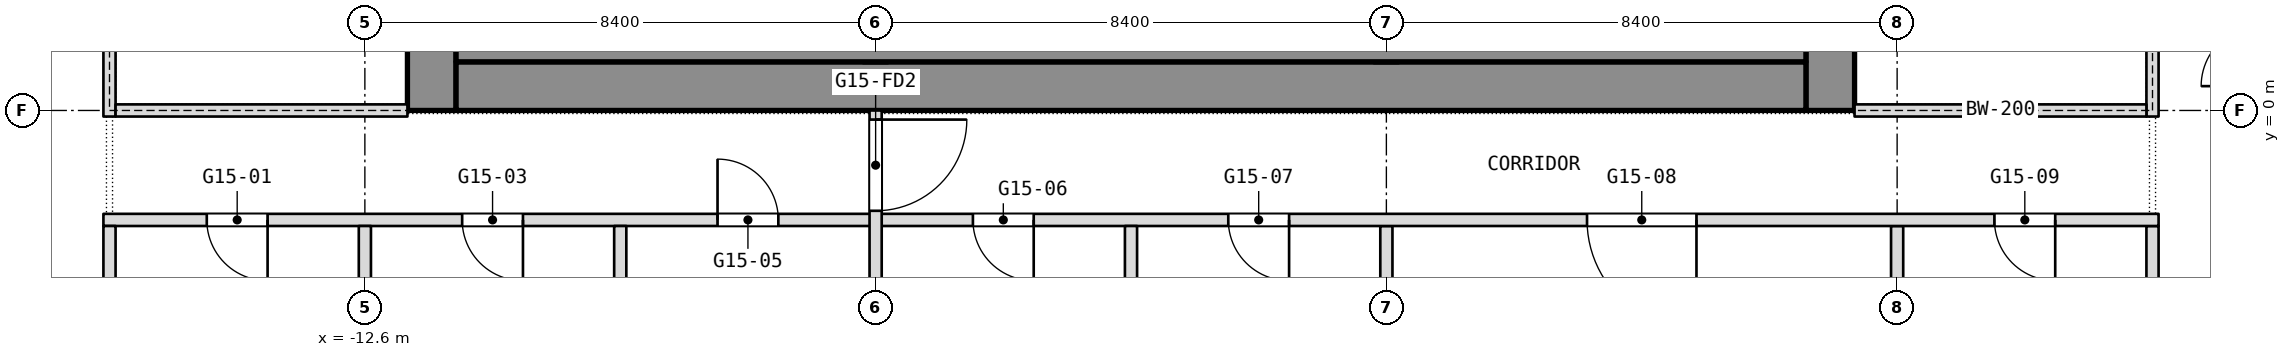
"""IFC4 building model, lengths in metres.
Left out: names, types, materials, properties, quantities, classifications, styles, units other than length and angle.
Written with IfcOpenShell. Run it as: python <this file> out.ifc"""

import sys

from ifc_helpers import new_model, si_unit, direction, frame, frame_2d, origin, place, context, subcontext, project, spatial, rectangle, extrude, element, fill, save


model = new_model("IFC4")
c1 = context("Model", 3, precision=1e-05, world=origin(), true_north=direction((0.0, 1.0)))
c2 = subcontext(c1, "Body", "Model", "MODEL_VIEW")
j1 = project(units=[si_unit("LENGTHUNIT", "METRE"), si_unit("PLANEANGLEUNIT", "RADIAN")], contexts=[c1])
p1 = place(None, origin())
s1 = spatial("IfcSite", under=j1, at=p1, CompositionType="ELEMENT")
p2 = place(p1, origin())
s2 = spatial("IfcBuilding", under=s1, at=p2, CompositionType="ELEMENT")
p3 = place(p2, frame((0.0, 0.0, 194.9)))
s3 = spatial("IfcBuildingStorey", under=s2, at=p3, CompositionType="ELEMENT", Elevation=194.9)
p4 = place(p3, frame((11.5, 0.0, 0.0), z_axis=(0.0, 0.0, 1.0), x_axis=(0.0, 1.0, 0.0)))
e1 = element("IfcWall", 1, at=p4, inside=s3, PredefinedType="SHEAR", context=c2, shape_type="SweptSolid", body=[
    extrude(rectangle(XDim=16.8, YDim=0.8, at=frame_2d((8.4, 0.0))), origin(), (0.0, 0.0, 1.0), 3.6),
])
p5 = place(p4, frame((2.3, 0.0, 0.0)))
e2 = element("IfcOpeningElement", 2, at=p5, cuts=e1, PredefinedType="OPENING", context=c2, shape_type="SweptSolid", body=[
    extrude(rectangle(XDim=1.1, YDim=2.1, at=frame_2d((0.55, 1.05))), frame((0.0, 0.4, 0.0), z_axis=(0.0, -1.0, 0.0), x_axis=(1.0, 0.0, 0.0)), (0.0, 0.0, 1.0), 0.8),
])
p6 = place(p4, frame((4.85, 0.0, 0.0)))
e3 = element("IfcOpeningElement", 3, at=p6, cuts=e1, PredefinedType="OPENING", context=c2, shape_type="SweptSolid", body=[
    extrude(rectangle(XDim=1.1, YDim=2.1, at=frame_2d((0.55, 1.05))), frame((0.0, 0.4, 0.0), z_axis=(0.0, -1.0, 0.0), x_axis=(1.0, 0.0, 0.0)), (0.0, 0.0, 1.0), 0.8),
])
p7 = place(p4, frame((6.825, 0.0, 0.0)))
e4 = element("IfcOpeningElement", 4, at=p7, cuts=e1, PredefinedType="OPENING", context=c2, shape_type="SweptSolid", body=[
    extrude(rectangle(XDim=1.2, YDim=2.1, at=frame_2d((0.6, 1.05))), frame((0.0, 0.4, 0.0), z_axis=(0.0, -1.0, 0.0), x_axis=(1.0, 0.0, 0.0)), (0.0, 0.0, 1.0), 0.8),
])
p8 = place(p4, frame((13.4, 0.0, 0.0)))
e5 = element("IfcOpeningElement", 5, at=p8, cuts=e1, PredefinedType="OPENING", context=c2, shape_type="SweptSolid", body=[
    extrude(rectangle(XDim=1.1, YDim=2.1, at=frame_2d((0.55, 1.05))), frame((0.0, 0.4, 0.0), z_axis=(0.0, -1.0, 0.0), x_axis=(1.0, 0.0, 0.0)), (0.0, 0.0, 1.0), 0.8),
])
p9 = place(p4, frame((10.85, 0.0, 0.0)))
e6 = element("IfcOpeningElement", 6, at=p9, cuts=e1, PredefinedType="OPENING", context=c2, shape_type="SweptSolid", body=[
    extrude(rectangle(XDim=1.1, YDim=2.1, at=frame_2d((0.55, 1.05))), frame((0.0, 0.4, 0.0), z_axis=(0.0, -1.0, 0.0), x_axis=(1.0, 0.0, 0.0)), (0.0, 0.0, 1.0), 0.8),
])
p10 = place(p4, frame((8.775, 0.0, 0.0)))
e7 = element("IfcOpeningElement", 7, at=p10, cuts=e1, PredefinedType="OPENING", context=c2, shape_type="SweptSolid", body=[
    extrude(rectangle(XDim=1.2, YDim=2.1, at=frame_2d((0.6, 1.05))), frame((0.0, 0.4, 0.0), z_axis=(0.0, -1.0, 0.0), x_axis=(1.0, 0.0, 0.0)), (0.0, 0.0, 1.0), 0.8),
])
p11 = place(p3, frame((-11.5, 0.0, 0.0), z_axis=(0.0, 0.0, 1.0), x_axis=(0.0, 1.0, 0.0)))
e8 = element("IfcWall", 8, at=p11, inside=s3, PredefinedType="SHEAR", context=c2, shape_type="SweptSolid", body=[
    extrude(rectangle(XDim=16.8, YDim=0.8, at=frame_2d((8.4, 0.0))), origin(), (0.0, 0.0, 1.0), 3.6),
])
p12 = place(p11, frame((1.837, 0.0, 0.0)))
e9 = element("IfcOpeningElement", 9, at=p12, cuts=e8, PredefinedType="OPENING", context=c2, shape_type="SweptSolid", body=[
    extrude(rectangle(XDim=0.9, YDim=2.1, at=frame_2d((0.45, 1.05))), frame((0.0, 0.4, 0.0), z_axis=(0.0, -1.0, 0.0), x_axis=(1.0, 0.0, 0.0)), (0.0, 0.0, 1.0), 0.8),
])
p13 = place(p11, frame((4.462, 0.0, 0.0)))
e10 = element("IfcOpeningElement", 10, at=p13, cuts=e8, PredefinedType="OPENING", context=c2, shape_type="SweptSolid", body=[
    extrude(rectangle(XDim=0.9, YDim=2.1, at=frame_2d((0.45, 1.05))), frame((0.0, 0.4, 0.0), z_axis=(0.0, -1.0, 0.0), x_axis=(1.0, 0.0, 0.0)), (0.0, 0.0, 1.0), 0.8),
])
p14 = place(p11, frame((6.825, 0.0, 0.0)))
e11 = element("IfcOpeningElement", 11, at=p14, cuts=e8, PredefinedType="OPENING", context=c2, shape_type="SweptSolid", body=[
    extrude(rectangle(XDim=1.2, YDim=2.1, at=frame_2d((0.6, 1.05))), frame((0.0, 0.4, 0.0), z_axis=(0.0, -1.0, 0.0), x_axis=(1.0, 0.0, 0.0)), (0.0, 0.0, 1.0), 0.8),
])
p15 = place(p11, frame((12.3, 0.0, 0.0)))
e12 = element("IfcOpeningElement", 12, at=p15, cuts=e8, PredefinedType="OPENING", context=c2, shape_type="SweptSolid", body=[
    extrude(rectangle(XDim=0.9, YDim=2.1, at=frame_2d((0.45, 1.05))), frame((0.0, 0.4, 0.0), z_axis=(0.0, -1.0, 0.0), x_axis=(1.0, 0.0, 0.0)), (0.0, 0.0, 1.0), 0.8),
])
p16 = place(p11, frame((8.775, 0.0, 0.0)))
e13 = element("IfcOpeningElement", 13, at=p16, cuts=e8, PredefinedType="OPENING", context=c2, shape_type="SweptSolid", body=[
    extrude(rectangle(XDim=1.2, YDim=2.1, at=frame_2d((0.6, 1.05))), frame((0.0, 0.4, 0.0), z_axis=(0.0, -1.0, 0.0), x_axis=(1.0, 0.0, 0.0)), (0.0, 0.0, 1.0), 0.8),
])
p17 = place(p3, frame((-11.1, 0.4, 0.0), z_axis=(0.0, 0.0, 1.0), x_axis=(1.0, 0.0, 0.0)))
e14 = element("IfcWall", 14, at=p17, inside=s3, PredefinedType="SHEAR", context=c2, shape_type="SweptSolid", body=[
    extrude(rectangle(XDim=22.2, YDim=0.8, at=frame_2d((11.1, 0.0))), origin(), (0.0, 0.0, 1.0), 3.6),
])
p18 = place(p3, frame((-4.2, 0.8, 0.0), z_axis=(0.0, 0.0, 1.0), x_axis=(0.0, 1.0, 0.0)))
e15 = element("IfcWall", 15, at=p18, inside=s3, PredefinedType="SHEAR", context=c2, shape_type="SweptSolid", body=[
    extrude(rectangle(XDim=15.2, YDim=0.4, at=frame_2d((7.6, 0.0))), origin(), (0.0, 0.0, 1.0), 3.6),
])
p19 = place(p18, frame((8.5, 0.0, 0.0)))
e16 = element("IfcOpeningElement", 16, at=p19, cuts=e15, PredefinedType="OPENING", context=c2, shape_type="SweptSolid", body=[
    extrude(rectangle(XDim=1.2, YDim=2.1, at=frame_2d((0.6, 1.05))), frame((0.0, 0.2, 0.0), z_axis=(0.0, -1.0, 0.0), x_axis=(1.0, 0.0, 0.0)), (0.0, 0.0, 1.0), 0.4),
])
p20 = place(p3, frame((4.2, 0.8, 0.0), z_axis=(0.0, 0.0, 1.0), x_axis=(0.0, 1.0, 0.0)))
e17 = element("IfcWall", 17, at=p20, inside=s3, PredefinedType="SHEAR", context=c2, shape_type="SweptSolid", body=[
    extrude(rectangle(XDim=15.2, YDim=0.4, at=frame_2d((7.6, 0.0))), origin(), (0.0, 0.0, 1.0), 3.6),
])
p21 = place(p20, frame((5.95, 0.0, 0.0)))
e18 = element("IfcOpeningElement", 18, at=p21, cuts=e17, PredefinedType="OPENING", context=c2, shape_type="SweptSolid", body=[
    extrude(rectangle(XDim=1.2, YDim=2.1, at=frame_2d((0.6, 1.05))), frame((0.0, 0.2, 0.0), z_axis=(0.0, -1.0, 0.0), x_axis=(1.0, 0.0, 0.0)), (0.0, 0.0, 1.0), 0.4),
])
for number, where, z_axis, x_axis in (
    (19, (16.8, -7.8, 0.0), (0.0, 0.0, 1.0), (0.0, 1.0, 0.0)),
    (20, (12.6, -7.8, 0.0), (0.0, 0.0, 1.0), (0.0, 1.0, 0.0)),
):
    element("IfcWall", number, at=place(p3, frame(where, z_axis=z_axis, x_axis=x_axis)), inside=s3, PredefinedType="PARTITIONING", context=c2, shape_type="SweptSolid", body=[
        extrude(rectangle(XDim=5.9, YDim=0.2, at=frame_2d((2.95, 0.0))), origin(), (0.0, 0.0, 1.0), 3.34),
    ])
p22 = place(p3, frame((4.2, -11.6, 0.0), z_axis=(0.0, 0.0, 1.0), x_axis=(0.0, 1.0, 0.0)))
e21 = element("IfcWall", 21, at=p22, inside=s3, PredefinedType="PARTITIONING", context=c2, shape_type="SweptSolid", body=[
    extrude(rectangle(XDim=9.7, YDim=0.2, at=frame_2d((4.85, 0.0))), origin(), (0.0, 0.0, 1.0), 3.34),
])
p23 = place(p3, frame((-16.9, -1.8, 0.0), z_axis=(0.0, 0.0, 1.0), x_axis=(1.0, 0.0, 0.0)))
e22 = element("IfcWall", 22, at=p23, inside=s3, PredefinedType="PARTITIONING", context=c2, shape_type="SweptSolid", body=[
    extrude(rectangle(XDim=33.8, YDim=0.2, at=frame_2d((16.9, 0.0))), origin(), (0.0, 0.0, 1.0), 3.34),
])
p24 = place(p23, frame((1.7, 0.0, 0.0)))
e23 = element("IfcOpeningElement", 23, at=p24, cuts=e22, PredefinedType="OPENING", context=c2, shape_type="SweptSolid", body=[
    extrude(rectangle(XDim=1.0, YDim=2.1, at=frame_2d((0.5, 1.05))), frame((0.0, 0.1, 0.0), z_axis=(0.0, -1.0, 0.0), x_axis=(1.0, 0.0, 0.0)), (0.0, 0.0, 1.0), 0.2),
])
p25 = place(p23, frame((5.9, 0.0, 0.0)))
e24 = element("IfcOpeningElement", 24, at=p25, cuts=e22, PredefinedType="OPENING", context=c2, shape_type="SweptSolid", body=[
    extrude(rectangle(XDim=1.0, YDim=2.1, at=frame_2d((0.5, 1.05))), frame((0.0, 0.1, 0.0), z_axis=(0.0, -1.0, 0.0), x_axis=(1.0, 0.0, 0.0)), (0.0, 0.0, 1.0), 0.2),
])
p26 = place(p23, frame((10.1, 0.0, 0.0)))
e25 = element("IfcOpeningElement", 25, at=p26, cuts=e22, PredefinedType="OPENING", context=c2, shape_type="SweptSolid", body=[
    extrude(rectangle(XDim=1.0, YDim=2.1, at=frame_2d((0.5, 1.05))), frame((0.0, 0.1, 0.0), z_axis=(0.0, -1.0, 0.0), x_axis=(1.0, 0.0, 0.0)), (0.0, 0.0, 1.0), 0.2),
])
p27 = place(p23, frame((14.3, 0.0, 0.0)))
e26 = element("IfcOpeningElement", 26, at=p27, cuts=e22, PredefinedType="OPENING", context=c2, shape_type="SweptSolid", body=[
    extrude(rectangle(XDim=1.0, YDim=2.1, at=frame_2d((0.5, 1.05))), frame((0.0, 0.1, 0.0), z_axis=(0.0, -1.0, 0.0), x_axis=(1.0, 0.0, 0.0)), (0.0, 0.0, 1.0), 0.2),
])
p28 = place(p23, frame((18.5, 0.0, 0.0)))
e27 = element("IfcOpeningElement", 27, at=p28, cuts=e22, PredefinedType="OPENING", context=c2, shape_type="SweptSolid", body=[
    extrude(rectangle(XDim=1.0, YDim=2.1, at=frame_2d((0.5, 1.05))), frame((0.0, 0.1, 0.0), z_axis=(0.0, -1.0, 0.0), x_axis=(1.0, 0.0, 0.0)), (0.0, 0.0, 1.0), 0.2),
])
p29 = place(p23, frame((24.4, 0.0, 0.0)))
e28 = element("IfcOpeningElement", 28, at=p29, cuts=e22, PredefinedType="OPENING", context=c2, shape_type="SweptSolid", body=[
    extrude(rectangle(XDim=1.8, YDim=2.1, at=frame_2d((0.9, 1.05))), frame((0.0, 0.1, 0.0), z_axis=(0.0, -1.0, 0.0), x_axis=(1.0, 0.0, 0.0)), (0.0, 0.0, 1.0), 0.2),
])
p30 = place(p23, frame((31.1, 0.0, 0.0)))
e29 = element("IfcOpeningElement", 29, at=p30, cuts=e22, PredefinedType="OPENING", context=c2, shape_type="SweptSolid", body=[
    extrude(rectangle(XDim=1.0, YDim=2.1, at=frame_2d((0.5, 1.05))), frame((0.0, 0.1, 0.0), z_axis=(0.0, -1.0, 0.0), x_axis=(1.0, 0.0, 0.0)), (0.0, 0.0, 1.0), 0.2),
])
p31 = place(p3, frame((0.0, -11.6, 0.0), z_axis=(0.0, 0.0, 1.0), x_axis=(0.0, 1.0, 0.0)))
e30 = element("IfcWall", 30, at=p31, inside=s3, PredefinedType="PARTITIONING", context=c2, shape_type="SweptSolid", body=[
    extrude(rectangle(XDim=9.7, YDim=0.2, at=frame_2d((4.85, 0.0))), origin(), (0.0, 0.0, 1.0), 3.34),
])
p32 = place(p3, frame((-4.2, -13.6, 0.0), z_axis=(0.0, 0.0, 1.0), x_axis=(0.0, 1.0, 0.0)))
e31 = element("IfcWall", 31, at=p32, inside=s3, PredefinedType="PARTITIONING", context=c2, shape_type="SweptSolid", body=[
    extrude(rectangle(XDim=13.6, YDim=0.2, at=frame_2d((6.8, 0.0))), origin(), (0.0, 0.0, 1.0), 3.34),
])
p33 = place(p32, frame((11.95, 0.0, 0.0)))
e32 = element("IfcOpeningElement", 32, at=p33, cuts=e31, PredefinedType="OPENING", context=c2, shape_type="SweptSolid", body=[
    extrude(rectangle(XDim=1.5, YDim=2.1, at=frame_2d((0.75, 1.05))), frame((0.0, 0.1, 0.0), z_axis=(0.0, -1.0, 0.0), x_axis=(1.0, 0.0, 0.0)), (0.0, 0.0, 1.0), 0.2),
])
p34 = place(p32, frame((0.25, 0.0, 0.0)))
e33 = element("IfcOpeningElement", 33, at=p34, cuts=e31, PredefinedType="OPENING", context=c2, shape_type="SweptSolid", body=[
    extrude(rectangle(XDim=1.5, YDim=2.1, at=frame_2d((0.75, 1.05))), frame((0.0, 0.1, 0.0), z_axis=(0.0, -1.0, 0.0), x_axis=(1.0, 0.0, 0.0)), (0.0, 0.0, 1.0), 0.2),
])
p35 = place(p3, frame((-8.4, -8.0, 0.0), z_axis=(0.0, 0.0, 1.0), x_axis=(0.0, 1.0, 0.0)))
e34 = element("IfcWall", 34, at=p35, inside=s3, PredefinedType="PARTITIONING", context=c2, shape_type="SweptSolid", body=[
    extrude(rectangle(XDim=6.1, YDim=0.2, at=frame_2d((3.05, 0.0))), origin(), (0.0, 0.0, 1.0), 3.34),
])
p36 = place(p3, frame((-12.6, -7.8, 0.0), z_axis=(0.0, 0.0, 1.0), x_axis=(0.0, 1.0, 0.0)))
e35 = element("IfcWall", 35, at=p36, inside=s3, PredefinedType="PARTITIONING", context=c2, shape_type="SweptSolid", body=[
    extrude(rectangle(XDim=5.9, YDim=0.2, at=frame_2d((2.95, 0.0))), origin(), (0.0, 0.0, 1.0), 3.34),
])
p37 = place(p3, frame((-16.8, -8.0, 0.0), z_axis=(0.0, 0.0, 1.0), x_axis=(0.0, 1.0, 0.0)))
e36 = element("IfcWall", 36, at=p37, inside=s3, PredefinedType="PARTITIONING", context=c2, shape_type="SweptSolid", body=[
    extrude(rectangle(XDim=6.1, YDim=0.2, at=frame_2d((3.05, 0.0))), origin(), (0.0, 0.0, 1.0), 3.34),
])
p38 = place(p3, frame((-11.1, 1.15, 0.0), z_axis=(0.0, 0.0, 1.0), x_axis=(1.0, 0.0, 0.0)))
e37 = element("IfcWall", 37, at=p38, inside=s3, PredefinedType="PARTITIONING", context=c2, shape_type="SweptSolid", body=[
    extrude(rectangle(XDim=22.2, YDim=0.7, at=frame_2d((11.1, 0.0))), origin(), (0.0, 0.0, 1.0), 3.34),
])
p39 = place(p3, frame((-16.8, -0.1, 0.0), z_axis=(0.0, 0.0, 1.0), x_axis=(0.0, 1.0, 0.0)))
e38 = element("IfcWall", 38, at=p39, inside=s3, PredefinedType="PARTITIONING", context=c2, shape_type="SweptSolid", body=[
    extrude(rectangle(XDim=17.0, YDim=0.2, at=frame_2d((8.5, 0.0))), origin(), (0.0, 0.0, 1.0), 3.34),
])
p40 = place(p39, frame((2.2, 0.0, 0.0)))
e39 = element("IfcOpeningElement", 39, at=p40, cuts=e38, PredefinedType="OPENING", context=c2, shape_type="SweptSolid", body=[
    extrude(rectangle(XDim=1.8, YDim=2.1, at=frame_2d((0.9, 1.05))), frame((0.0, 0.1, 0.0), z_axis=(0.0, -1.0, 0.0), x_axis=(1.0, 0.0, 0.0)), (0.0, 0.0, 1.0), 0.2),
])
p41 = place(p39, frame((13.0, 0.0, 0.0)))
e40 = element("IfcOpeningElement", 40, at=p41, cuts=e38, PredefinedType="OPENING", context=c2, shape_type="SweptSolid", body=[
    extrude(rectangle(XDim=1.8, YDim=2.1, at=frame_2d((0.9, 1.05))), frame((0.0, 0.1, 0.0), z_axis=(0.0, -1.0, 0.0), x_axis=(1.0, 0.0, 0.0)), (0.0, 0.0, 1.0), 0.2),
])
p42 = place(p3, frame((-16.7, 0.0, 0.0), z_axis=(0.0, 0.0, 1.0), x_axis=(1.0, 0.0, 0.0)))
e41 = element("IfcWall", 41, at=p42, inside=s3, PredefinedType="PARTITIONING", context=c2, shape_type="SweptSolid", body=[
    extrude(rectangle(XDim=4.8, YDim=0.2, at=frame_2d((2.4, 0.0))), origin(), (0.0, 0.0, 1.0), 2.94),
])
p43 = place(p3, frame((16.8, -0.1, 0.0), z_axis=(0.0, 0.0, 1.0), x_axis=(0.0, 1.0, 0.0)))
e42 = element("IfcWall", 42, at=p43, inside=s3, PredefinedType="PARTITIONING", context=c2, shape_type="SweptSolid", body=[
    extrude(rectangle(XDim=17.0, YDim=0.2, at=frame_2d((8.5, 0.0))), origin(), (0.0, 0.0, 1.0), 3.34),
])
p44 = place(p43, frame((2.2, 0.0, 0.0)))
e43 = element("IfcOpeningElement", 43, at=p44, cuts=e42, PredefinedType="OPENING", context=c2, shape_type="SweptSolid", body=[
    extrude(rectangle(XDim=1.8, YDim=2.1, at=frame_2d((0.9, 1.05))), frame((0.0, 0.1, 0.0), z_axis=(0.0, -1.0, 0.0), x_axis=(1.0, 0.0, 0.0)), (0.0, 0.0, 1.0), 0.2),
])
p45 = place(p43, frame((13.0, 0.0, 0.0)))
e44 = element("IfcOpeningElement", 44, at=p45, cuts=e42, PredefinedType="OPENING", context=c2, shape_type="SweptSolid", body=[
    extrude(rectangle(XDim=1.8, YDim=2.1, at=frame_2d((0.9, 1.05))), frame((0.0, 0.1, 0.0), z_axis=(0.0, -1.0, 0.0), x_axis=(1.0, 0.0, 0.0)), (0.0, 0.0, 1.0), 0.2),
])
p46 = place(p3, frame((11.9, 0.0, 0.0), z_axis=(0.0, 0.0, 1.0), x_axis=(1.0, 0.0, 0.0)))
e45 = element("IfcWall", 45, at=p46, inside=s3, PredefinedType="PARTITIONING", context=c2, shape_type="SweptSolid", body=[
    extrude(rectangle(XDim=4.8, YDim=0.2, at=frame_2d((2.4, 0.0))), origin(), (0.0, 0.0, 1.0), 2.94),
])
p47 = place(p24, origin())
e46 = element("IfcDoor", 46, at=p47, inside=s3, OperationType="SINGLE_SWING_LEFT", PredefinedType="DOOR", context=c2, shape_type="SweptSolid", body=[
    extrude(rectangle(XDim=1.0, YDim=2.1, at=frame_2d((0.5, 1.05))), frame((0.0, 0.025, 0.0), z_axis=(0.0, -1.0, 0.0), x_axis=(1.0, 0.0, 0.0)), (0.0, 0.0, 1.0), 0.05),
])
fill(e23, e46)
p48 = place(p25, origin())
e47 = element("IfcDoor", 47, at=p48, inside=s3, OperationType="SINGLE_SWING_LEFT", PredefinedType="DOOR", context=c2, shape_type="SweptSolid", body=[
    extrude(rectangle(XDim=1.0, YDim=2.1, at=frame_2d((0.5, 1.05))), frame((0.0, 0.025, 0.0), z_axis=(0.0, -1.0, 0.0), x_axis=(1.0, 0.0, 0.0)), (0.0, 0.0, 1.0), 0.05),
])
fill(e24, e47)
p49 = place(p26, origin())
e48 = element("IfcDoor", 48, at=p49, inside=s3, OperationType="SINGLE_SWING_RIGHT", PredefinedType="DOOR", context=c2, shape_type="SweptSolid", body=[
    extrude(rectangle(XDim=1.0, YDim=2.1, at=frame_2d((0.5, 1.05))), frame((0.0, 0.025, 0.0), z_axis=(0.0, -1.0, 0.0), x_axis=(1.0, 0.0, 0.0)), (0.0, 0.0, 1.0), 0.05),
])
fill(e25, e48)
p50 = place(p27, origin())
e49 = element("IfcDoor", 49, at=p50, inside=s3, OperationType="SINGLE_SWING_LEFT", PredefinedType="DOOR", context=c2, shape_type="SweptSolid", body=[
    extrude(rectangle(XDim=1.0, YDim=2.1, at=frame_2d((0.5, 1.05))), frame((0.0, 0.025, 0.0), z_axis=(0.0, -1.0, 0.0), x_axis=(1.0, 0.0, 0.0)), (0.0, 0.0, 1.0), 0.05),
])
fill(e26, e49)
p51 = place(p28, origin())
e50 = element("IfcDoor", 50, at=p51, inside=s3, OperationType="SINGLE_SWING_RIGHT", PredefinedType="DOOR", context=c2, shape_type="SweptSolid", body=[
    extrude(rectangle(XDim=1.0, YDim=2.1, at=frame_2d((0.5, 1.05))), frame((0.0, 0.025, 0.0), z_axis=(0.0, -1.0, 0.0), x_axis=(1.0, 0.0, 0.0)), (0.0, 0.0, 1.0), 0.05),
])
fill(e27, e50)
p52 = place(p29, origin())
e51 = element("IfcDoor", 51, at=p52, inside=s3, OperationType="DOUBLE_DOOR_SINGLE_SWING", PredefinedType="DOOR", context=c2, shape_type="SweptSolid", body=[
    extrude(rectangle(XDim=1.8, YDim=2.1, at=frame_2d((0.9, 1.05))), frame((0.0, 0.025, 0.0), z_axis=(0.0, -1.0, 0.0), x_axis=(1.0, 0.0, 0.0)), (0.0, 0.0, 1.0), 0.05),
])
fill(e28, e51)
p53 = place(p30, origin())
e52 = element("IfcDoor", 52, at=p53, inside=s3, OperationType="SINGLE_SWING_RIGHT", PredefinedType="DOOR", context=c2, shape_type="SweptSolid", body=[
    extrude(rectangle(XDim=1.0, YDim=2.1, at=frame_2d((0.5, 1.05))), frame((0.0, 0.025, 0.0), z_axis=(0.0, -1.0, 0.0), x_axis=(1.0, 0.0, 0.0)), (0.0, 0.0, 1.0), 0.05),
])
fill(e29, e52)
p54 = place(p33, origin())
e53 = element("IfcDoor", 53, at=p54, inside=s3, OperationType="DOUBLE_DOOR_DOUBLE_SWING", PredefinedType="DOOR", context=c2, shape_type="SweptSolid", body=[
    extrude(rectangle(XDim=1.5, YDim=2.1, at=frame_2d((0.75, 1.05))), frame((0.0, 0.025, 0.0), z_axis=(0.0, -1.0, 0.0), x_axis=(1.0, 0.0, 0.0)), (0.0, 0.0, 1.0), 0.05),
])
fill(e32, e53)
save(model, sys.argv[1])
